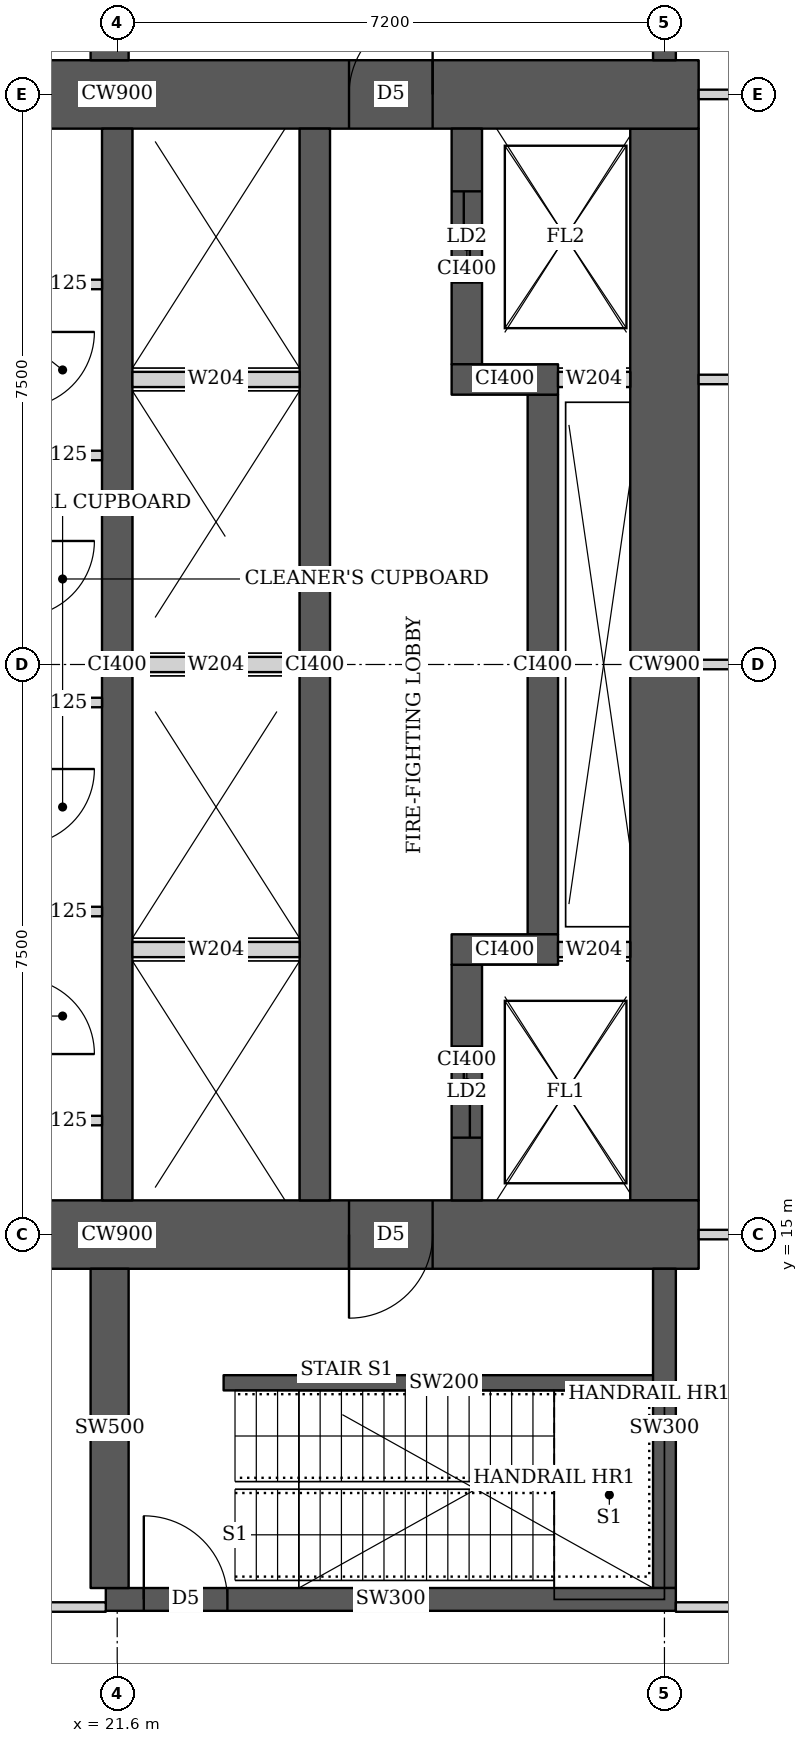
"""IFC4 building model, lengths in metres.
Left out: names, types, materials, properties, quantities, classifications, styles, units other than length and angle.
Written with IfcOpenShell. Run it as: python <this file> out.ifc"""

import sys

from ifc_helpers import new_model, si_unit, direction, frame, frame_2d, origin, place, context, subcontext, project, spatial, rectangle, extrude, element, fill, save


model = new_model("IFC4")
c1 = context("Model", 3, precision=1e-05, world=origin(), true_north=direction((0.0, 1.0)))
c2 = subcontext(c1, "Body", "Model", "MODEL_VIEW")
j1 = project(units=[si_unit("LENGTHUNIT", "METRE"), si_unit("PLANEANGLEUNIT", "RADIAN")], contexts=[c1])
p1 = place(None, origin())
s1 = spatial("IfcSite", under=j1, at=p1, CompositionType="ELEMENT")
p2 = place(p1, origin())
s2 = spatial("IfcBuilding", under=s1, at=p2, CompositionType="ELEMENT")
p3 = place(p2, frame((0.0, 0.0, 14.6)))
s3 = spatial("IfcBuildingStorey", under=s2, at=p3, CompositionType="ELEMENT", Elevation=14.6)
p4 = place(p3, frame((13.95, 15.0, 0.0), z_axis=(0.0, 0.0, 1.0), x_axis=(1.0, 0.0, 0.0)))
e1 = element("IfcWall", 1, at=p4, inside=s3, PredefinedType="SHEAR", context=c2, shape_type="SweptSolid", body=[
    extrude(rectangle(XDim=15.3, YDim=0.9, at=frame_2d((7.65, 0.0))), origin(), (0.0, 0.0, 1.0), 5.4),
])
p5 = place(p4, frame((4.45, 0.0, 0.0)))
e2 = element("IfcOpeningElement", 2, at=p5, cuts=e1, PredefinedType="OPENING", context=c2, shape_type="SweptSolid", body=[
    extrude(rectangle(XDim=1.8, YDim=2.1, at=frame_2d((0.9, 1.05))), frame((0.0, 0.46, 0.0), z_axis=(0.0, -1.0, 0.0), x_axis=(1.0, 0.0, 0.0)), (0.0, 0.0, 1.0), 0.92),
])
p6 = place(p4, frame((10.7, 0.0, 0.0)))
e3 = element("IfcOpeningElement", 3, at=p6, cuts=e1, PredefinedType="OPENING", context=c2, shape_type="SweptSolid", body=[
    extrude(rectangle(XDim=1.1, YDim=2.1, at=frame_2d((0.55, 1.05))), frame((0.0, 0.46, 0.0), z_axis=(0.0, -1.0, 0.0), x_axis=(1.0, 0.0, 0.0)), (0.0, 0.0, 1.0), 0.92),
])
p7 = place(p3, frame((13.95, 30.0, 0.0), z_axis=(0.0, 0.0, 1.0), x_axis=(1.0, 0.0, 0.0)))
e4 = element("IfcWall", 4, at=p7, inside=s3, PredefinedType="SHEAR", context=c2, shape_type="SweptSolid", body=[
    extrude(rectangle(XDim=15.3, YDim=0.9, at=frame_2d((7.65, 0.0))), origin(), (0.0, 0.0, 1.0), 5.4),
])
p8 = place(p7, frame((4.45, 0.0, 0.0)))
e5 = element("IfcOpeningElement", 5, at=p8, cuts=e4, PredefinedType="OPENING", context=c2, shape_type="SweptSolid", body=[
    extrude(rectangle(XDim=1.8, YDim=2.1, at=frame_2d((0.9, 1.05))), frame((0.0, 0.46, 0.0), z_axis=(0.0, -1.0, 0.0), x_axis=(1.0, 0.0, 0.0)), (0.0, 0.0, 1.0), 0.92),
])
p9 = place(p7, frame((10.7, 0.0, 0.0)))
e6 = element("IfcOpeningElement", 6, at=p9, cuts=e4, PredefinedType="OPENING", context=c2, shape_type="SweptSolid", body=[
    extrude(rectangle(XDim=1.1, YDim=2.1, at=frame_2d((0.55, 1.05))), frame((0.0, 0.46, 0.0), z_axis=(0.0, -1.0, 0.0), x_axis=(1.0, 0.0, 0.0)), (0.0, 0.0, 1.0), 0.92),
])
p10 = place(p3, frame((28.8, 15.45, 0.0), z_axis=(0.0, 0.0, 1.0), x_axis=(0.0, 1.0, 0.0)))
e7 = element("IfcWall", 7, at=p10, inside=s3, PredefinedType="SHEAR", context=c2, shape_type="SweptSolid", body=[
    extrude(rectangle(XDim=14.1, YDim=0.9, at=frame_2d((7.05, 0.0))), origin(), (0.0, 0.0, 1.0), 5.4),
])
for number, where, z_axis, x_axis in (
    (8, (21.6, 15.45, 0.0), (0.0, 0.0, 1.0), (0.0, 1.0, 0.0)),
    (9, (24.2, 15.45, 0.0), (0.0, 0.0, 1.0), (0.0, 1.0, 0.0)),
):
    element("IfcWall", number, at=place(p3, frame(where, z_axis=z_axis, x_axis=x_axis)), inside=s3, PredefinedType="SHEAR", context=c2, shape_type="SweptSolid", body=[
        extrude(rectangle(XDim=14.1, YDim=0.4, at=frame_2d((7.05, 0.0))), origin(), (0.0, 0.0, 1.0), 5.4),
    ])
p11 = place(p3, frame((26.2, 15.45, 0.0), z_axis=(0.0, 0.0, 1.0), x_axis=(0.0, 1.0, 0.0)))
e10 = element("IfcWall", 10, at=p11, inside=s3, PredefinedType="SHEAR", context=c2, shape_type="SweptSolid", body=[
    extrude(rectangle(XDim=3.1, YDim=0.4, at=frame_2d((1.55, 0.0))), origin(), (0.0, 0.0, 1.0), 5.4),
])
p12 = place(p11, frame((0.825, 0.0, 0.0)))
e11 = element("IfcOpeningElement", 11, at=p12, cuts=e10, PredefinedType="OPENING", context=c2, shape_type="SweptSolid", body=[
    extrude(rectangle(XDim=1.2, YDim=2.1, at=frame_2d((0.6, 1.05))), frame((0.0, 0.21, 0.0), z_axis=(0.0, -1.0, 0.0), x_axis=(1.0, 0.0, 0.0)), (0.0, 0.0, 1.0), 0.42),
])
p13 = place(p3, frame((26.0, 18.75, 0.0), z_axis=(0.0, 0.0, 1.0), x_axis=(1.0, 0.0, 0.0)))
e12 = element("IfcWall", 12, at=p13, inside=s3, PredefinedType="SHEAR", context=c2, shape_type="SweptSolid", body=[
    extrude(rectangle(XDim=1.4, YDim=0.4, at=frame_2d((0.7, 0.0))), origin(), (0.0, 0.0, 1.0), 5.4),
])
p14 = place(p3, frame((27.2, 18.95, 0.0), z_axis=(0.0, 0.0, 1.0), x_axis=(0.0, 1.0, 0.0)))
e13 = element("IfcWall", 13, at=p14, inside=s3, PredefinedType="SHEAR", context=c2, shape_type="SweptSolid", body=[
    extrude(rectangle(XDim=7.1, YDim=0.4, at=frame_2d((3.55, 0.0))), origin(), (0.0, 0.0, 1.0), 5.4),
])
p15 = place(p3, frame((26.0, 26.25, 0.0), z_axis=(0.0, 0.0, 1.0), x_axis=(1.0, 0.0, 0.0)))
e14 = element("IfcWall", 14, at=p15, inside=s3, PredefinedType="SHEAR", context=c2, shape_type="SweptSolid", body=[
    extrude(rectangle(XDim=1.4, YDim=0.4, at=frame_2d((0.7, 0.0))), origin(), (0.0, 0.0, 1.0), 5.4),
])
p16 = place(p3, frame((26.2, 26.45, 0.0), z_axis=(0.0, 0.0, 1.0), x_axis=(0.0, 1.0, 0.0)))
e15 = element("IfcWall", 15, at=p16, inside=s3, PredefinedType="SHEAR", context=c2, shape_type="SweptSolid", body=[
    extrude(rectangle(XDim=3.1, YDim=0.4, at=frame_2d((1.55, 0.0))), origin(), (0.0, 0.0, 1.0), 5.4),
])
p17 = place(p16, frame((1.075, 0.0, 0.0)))
e16 = element("IfcOpeningElement", 16, at=p17, cuts=e15, PredefinedType="OPENING", context=c2, shape_type="SweptSolid", body=[
    extrude(rectangle(XDim=1.2, YDim=2.1, at=frame_2d((0.6, 1.05))), frame((0.0, 0.21, 0.0), z_axis=(0.0, -1.0, 0.0), x_axis=(1.0, 0.0, 0.0)), (0.0, 0.0, 1.0), 0.42),
])
p18 = place(p3, frame((21.45, 10.2, 0.0), z_axis=(0.0, 0.0, 1.0), x_axis=(1.0, 0.0, 0.0)))
e17 = element("IfcWall", 17, at=p18, inside=s3, PredefinedType="SHEAR", context=c2, shape_type="SweptSolid", body=[
    extrude(rectangle(XDim=7.5, YDim=0.3, at=frame_2d((3.75, 0.0))), origin(), (0.0, 0.0, 1.0), 5.4),
])
p19 = place(p18, frame((0.5, 0.0, 0.0)))
e18 = element("IfcOpeningElement", 18, at=p19, cuts=e17, PredefinedType="OPENING", context=c2, shape_type="SweptSolid", body=[
    extrude(rectangle(XDim=1.1, YDim=2.1, at=frame_2d((0.55, 1.05))), frame((0.0, 0.16, 0.0), z_axis=(0.0, -1.0, 0.0), x_axis=(1.0, 0.0, 0.0)), (0.0, 0.0, 1.0), 0.32),
])
p20 = place(p3, frame((21.5, 10.35, 0.0), z_axis=(0.0, 0.0, 1.0), x_axis=(0.0, 1.0, 0.0)))
e19 = element("IfcWall", 19, at=p20, inside=s3, PredefinedType="SHEAR", context=c2, shape_type="SweptSolid", body=[
    extrude(rectangle(XDim=4.2, YDim=0.5, at=frame_2d((2.1, 0.0))), origin(), (0.0, 0.0, 1.0), 5.4),
])
p21 = place(p3, frame((28.8, 10.35, 0.0), z_axis=(0.0, 0.0, 1.0), x_axis=(0.0, 1.0, 0.0)))
e20 = element("IfcWall", 20, at=p21, inside=s3, PredefinedType="SHEAR", context=c2, shape_type="SweptSolid", body=[
    extrude(rectangle(XDim=4.2, YDim=0.3, at=frame_2d((2.1, 0.0))), origin(), (0.0, 0.0, 1.0), 5.4),
])
p22 = place(p3, frame((21.5, 30.45, 0.0), z_axis=(0.0, 0.0, 1.0), x_axis=(0.0, 1.0, 0.0)))
e21 = element("IfcWall", 21, at=p22, inside=s3, PredefinedType="SHEAR", context=c2, shape_type="SweptSolid", body=[
    extrude(rectangle(XDim=4.2, YDim=0.5, at=frame_2d((2.1, 0.0))), origin(), (0.0, 0.0, 1.0), 5.4),
])
p23 = place(p3, frame((28.8, 30.45, 0.0), z_axis=(0.0, 0.0, 1.0), x_axis=(0.0, 1.0, 0.0)))
e22 = element("IfcWall", 22, at=p23, inside=s3, PredefinedType="SHEAR", context=c2, shape_type="SweptSolid", body=[
    extrude(rectangle(XDim=4.2, YDim=0.3, at=frame_2d((2.1, 0.0))), origin(), (0.0, 0.0, 1.0), 5.4),
])
p24 = place(p3, frame((10.163, 10.1, 0.0), z_axis=(0.0, 0.0, 1.0), x_axis=(1.0, 0.0, 0.0)))
e23 = element("IfcWall", 23, at=p24, inside=s3, PredefinedType="PARTITIONING", context=c2, shape_type="SweptSolid", body=[
    extrude(rectangle(XDim=11.287, YDim=0.125, at=frame_2d((5.644, 0.0))), origin(), (0.0, 0.0, 1.0), 3.1),
])
p25 = place(p24, frame((7.832, 0.0, 0.0)))
e24 = element("IfcOpeningElement", 24, at=p25, cuts=e23, PredefinedType="OPENING", context=c2, shape_type="SweptSolid", body=[
    extrude(rectangle(XDim=1.8, YDim=2.1, at=frame_2d((0.9, 1.05))), frame((0.0, 0.073, 0.0), z_axis=(0.0, -1.0, 0.0), x_axis=(1.0, 0.0, 0.0)), (0.0, 0.0, 1.0), 0.145),
])
p26 = place(p3, frame((28.95, 10.1, 0.0), z_axis=(0.0, 0.0, 1.0), x_axis=(1.0, 0.0, 0.0)))
e25 = element("IfcWall", 25, at=p26, inside=s3, PredefinedType="PARTITIONING", context=c2, shape_type="SweptSolid", body=[
    extrude(rectangle(XDim=9.188, YDim=0.125, at=frame_2d((4.594, 0.0))), origin(), (0.0, 0.0, 1.0), 3.1),
])
p27 = place(p3, frame((29.25, 15.0, 0.0), z_axis=(0.0, 0.0, 1.0), x_axis=(1.0, 0.0, 0.0)))
e26 = element("IfcWall", 26, at=p27, inside=s3, PredefinedType="PARTITIONING", context=c2, shape_type="SweptSolid", body=[
    extrude(rectangle(XDim=5.549, YDim=0.125, at=frame_2d((2.774, 0.0))), origin(), (0.0, 0.0, 1.0), 5.1),
])
p28 = place(p3, frame((29.25, 22.5, 0.0), z_axis=(0.0, 0.0, 1.0), x_axis=(1.0, 0.0, 0.0)))
e27 = element("IfcWall", 27, at=p28, inside=s3, PredefinedType="PARTITIONING", context=c2, shape_type="SweptSolid", body=[
    extrude(rectangle(XDim=2.549, YDim=0.125, at=frame_2d((1.274, 0.0))), origin(), (0.0, 0.0, 1.0), 3.5),
])
p29 = place(p3, frame((29.25, 30.0, 0.0), z_axis=(0.0, 0.0, 1.0), x_axis=(1.0, 0.0, 0.0)))
e28 = element("IfcWall", 28, at=p29, inside=s3, PredefinedType="PARTITIONING", context=c2, shape_type="SweptSolid", body=[
    extrude(rectangle(XDim=2.549, YDim=0.125, at=frame_2d((1.274, 0.0))), origin(), (0.0, 0.0, 1.0), 5.1),
])
p30 = place(p3, frame((29.25, 26.25, 0.0), z_axis=(0.0, 0.0, 1.0), x_axis=(1.0, 0.0, 0.0)))
e29 = element("IfcWall", 29, at=p30, inside=s3, PredefinedType="PARTITIONING", context=c2, shape_type="SweptSolid", body=[
    extrude(rectangle(XDim=5.838, YDim=0.125, at=frame_2d((2.919, 0.0))), origin(), (0.0, 0.0, 1.0), 5.1),
])
for number, where, z_axis, x_axis in (
    (30, (20.363, 16.5, 0.0), (0.0, 0.0, 1.0), (1.0, 0.0, 0.0)),
    (31, (20.363, 27.5, 0.0), (0.0, 0.0, 1.0), (1.0, 0.0, 0.0)),
    (32, (20.363, 19.25, 0.0), (0.0, 0.0, 1.0), (1.0, 0.0, 0.0)),
    (33, (20.363, 22.0, 0.0), (0.0, 0.0, 1.0), (1.0, 0.0, 0.0)),
    (34, (20.363, 25.25, 0.0), (0.0, 0.0, 1.0), (1.0, 0.0, 0.0)),
):
    element("IfcWall", number, at=place(p3, frame(where, z_axis=z_axis, x_axis=x_axis)), inside=s3, PredefinedType="PARTITIONING", context=c2, shape_type="SweptSolid", body=[
        extrude(rectangle(XDim=1.037, YDim=0.125, at=frame_2d((0.519, 0.0))), origin(), (0.0, 0.0, 1.0), 5.1),
    ])
p31 = place(p3, frame((23.0, 13.05, 0.0), z_axis=(0.0, 0.0, 1.0), x_axis=(1.0, 0.0, 0.0)))
e35 = element("IfcWall", 35, at=p31, inside=s3, PredefinedType="SHEAR", context=c2, shape_type="SweptSolid", body=[
    extrude(rectangle(XDim=5.8, YDim=0.2, at=frame_2d((2.9, 0.0))), origin(), (0.0, 0.0, 1.0), 5.4),
])
for number, where, z_axis, x_axis in (
    (36, (21.8, 18.75, 0.0), (0.0, 0.0, 1.0), (1.0, 0.0, 0.0)),
    (37, (21.8, 22.5, 0.0), (0.0, 0.0, 1.0), (1.0, 0.0, 0.0)),
    (38, (21.8, 26.25, 0.0), (0.0, 0.0, 1.0), (1.0, 0.0, 0.0)),
):
    element("IfcWall", number, at=place(p3, frame(where, z_axis=z_axis, x_axis=x_axis)), inside=s3, PredefinedType="SOLIDWALL", context=c2, shape_type="SweptSolid", body=[
        extrude(rectangle(XDim=2.2, YDim=0.2, at=frame_2d((1.1, 0.0))), origin(), (0.0, 0.0, 1.0), 5.1),
    ])
for number, where, z_axis, x_axis in (
    (39, (27.4, 18.75, 0.0), (0.0, 0.0, 1.0), (1.0, 0.0, 0.0)),
    (40, (27.4, 26.25, 0.0), (0.0, 0.0, 1.0), (1.0, 0.0, 0.0)),
):
    element("IfcWall", number, at=place(p3, frame(where, z_axis=z_axis, x_axis=x_axis)), inside=s3, PredefinedType="SOLIDWALL", context=c2, shape_type="SweptSolid", body=[
        extrude(rectangle(XDim=0.95, YDim=0.2, at=frame_2d((0.475, 0.0))), origin(), (0.0, 0.0, 1.0), 5.1),
    ])
p32 = place(p6, origin())
e41 = element("IfcDoor", 41, at=p32, inside=s3, OperationType="SINGLE_SWING_RIGHT", PredefinedType="DOOR", context=c2, shape_type="SweptSolid", body=[
    extrude(rectangle(XDim=1.1, YDim=2.1, at=frame_2d((0.55, 1.05))), frame((0.0, 0.025, 0.0), z_axis=(0.0, -1.0, 0.0), x_axis=(1.0, 0.0, 0.0)), (0.0, 0.0, 1.0), 0.05),
])
fill(e3, e41)
p33 = place(p9, origin())
e42 = element("IfcDoor", 42, at=p33, inside=s3, OperationType="SINGLE_SWING_RIGHT", PredefinedType="DOOR", context=c2, shape_type="SweptSolid", body=[
    extrude(rectangle(XDim=1.1, YDim=2.1, at=frame_2d((0.55, 1.05))), frame((0.0, 0.025, 0.0), z_axis=(0.0, -1.0, 0.0), x_axis=(1.0, 0.0, 0.0)), (0.0, 0.0, 1.0), 0.05),
])
fill(e6, e42)
p34 = place(p12, origin())
e43 = element("IfcDoor", 43, at=p34, inside=s3, OperationType="DOUBLE_DOOR_SLIDING", PredefinedType="DOOR", context=c2, shape_type="SweptSolid", body=[
    extrude(rectangle(XDim=1.2, YDim=2.1, at=frame_2d((0.6, 1.05))), frame((0.0, 0.025, 0.0), z_axis=(0.0, -1.0, 0.0), x_axis=(1.0, 0.0, 0.0)), (0.0, 0.0, 1.0), 0.05),
])
fill(e11, e43)
p35 = place(p17, origin())
e44 = element("IfcDoor", 44, at=p35, inside=s3, OperationType="DOUBLE_DOOR_SLIDING", PredefinedType="DOOR", context=c2, shape_type="SweptSolid", body=[
    extrude(rectangle(XDim=1.2, YDim=2.1, at=frame_2d((0.6, 1.05))), frame((0.0, 0.025, 0.0), z_axis=(0.0, -1.0, 0.0), x_axis=(1.0, 0.0, 0.0)), (0.0, 0.0, 1.0), 0.05),
])
fill(e16, e44)
p36 = place(p19, origin())
e45 = element("IfcDoor", 45, at=p36, inside=s3, OperationType="SINGLE_SWING_LEFT", PredefinedType="DOOR", context=c2, shape_type="SweptSolid", body=[
    extrude(rectangle(XDim=1.1, YDim=2.1, at=frame_2d((0.55, 1.05))), frame((0.0, 0.025, 0.0), z_axis=(0.0, -1.0, 0.0), x_axis=(1.0, 0.0, 0.0)), (0.0, 0.0, 1.0), 0.05),
])
fill(e18, e45)
save(model, sys.argv[1])
